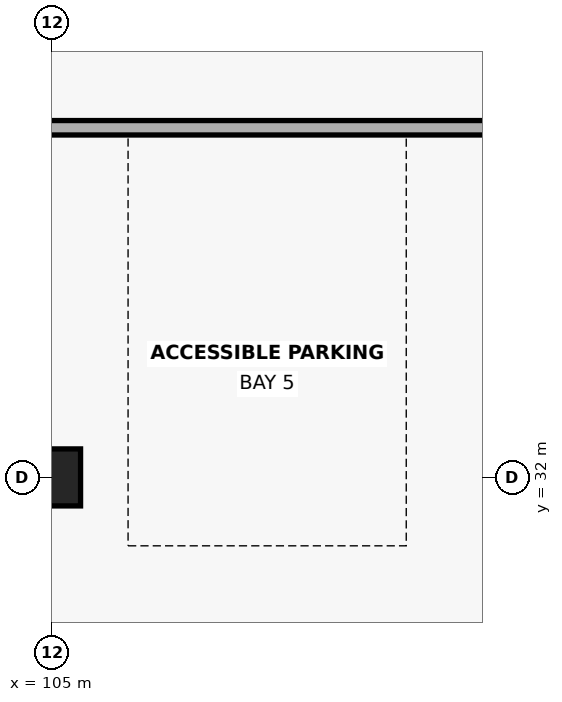
"""IFC4 building model, lengths in metres.
Left out: names, types, materials, properties, quantities, classifications, styles, units other than length and angle.
Written with IfcOpenShell. Run it as: python <this file> out.ifc"""

import sys

from ifc_helpers import new_model, si_unit, direction, frame, frame_2d, origin, origin_2d, place, context, subcontext, project, spatial, rectangle, extrude, element, save


model = new_model("IFC4")
c1 = context("Model", 3, precision=1e-05, world=origin(), true_north=direction((0.0, 1.0)))
c2 = subcontext(c1, "Body", "Model", "MODEL_VIEW")
j1 = project(units=[si_unit("LENGTHUNIT", "METRE"), si_unit("PLANEANGLEUNIT", "RADIAN")], contexts=[c1])
p1 = place(None, origin())
s1 = spatial("IfcSite", under=j1, at=p1, CompositionType="ELEMENT")
p2 = place(p1, origin())
s2 = spatial("IfcBuilding", under=s1, at=p2, CompositionType="ELEMENT")
p3 = place(p2, frame((0.0, 0.0, -4.5)))
s3 = spatial("IfcBuildingStorey", under=s2, at=p3, CompositionType="ELEMENT", Elevation=-4.5)
p4 = place(p3, frame((105.0, 32.0, 0.0), z_axis=(0.0, 0.0, 1.0), x_axis=(1.0, 0.0, 0.0)))
e1 = element("IfcColumn", 1, at=p4, inside=s3, PredefinedType="COLUMN", context=c2, shape_type="SweptSolid", body=[
    extrude(rectangle(XDim=0.75, YDim=0.75, at=origin_2d()), origin(), (0.0, 0.0, 1.0), 4.5),
])
p5 = place(p3, frame((114.08, 36.6, 0.0), z_axis=(0.0, 0.0, 1.0), x_axis=(-1.0, 0.0, 0.0)))
e2 = element("IfcWall", 2, at=p5, inside=s3, PredefinedType="STANDARD", context=c2, shape_type="SweptSolid", body=[
    extrude(rectangle(XDim=36.16, YDim=0.19, at=frame_2d((18.08, 0.0))), origin(), (0.0, 0.0, 1.0), 4.14),
])
p6 = place(p5, frame((12.247, 0.0, 0.0)))
e3 = element("IfcOpeningElement", 3, at=p6, cuts=e2, PredefinedType="OPENING", context=c2, shape_type="SweptSolid", body=[
    extrude(rectangle(XDim=1.6, YDim=2.25, at=frame_2d((0.8, 1.125))), frame((0.0, 0.107, 0.0), z_axis=(0.0, -1.0, 0.0), x_axis=(1.0, 0.0, 0.0)), (0.0, 0.0, 1.0), 0.214),
])
save(model, sys.argv[1])
